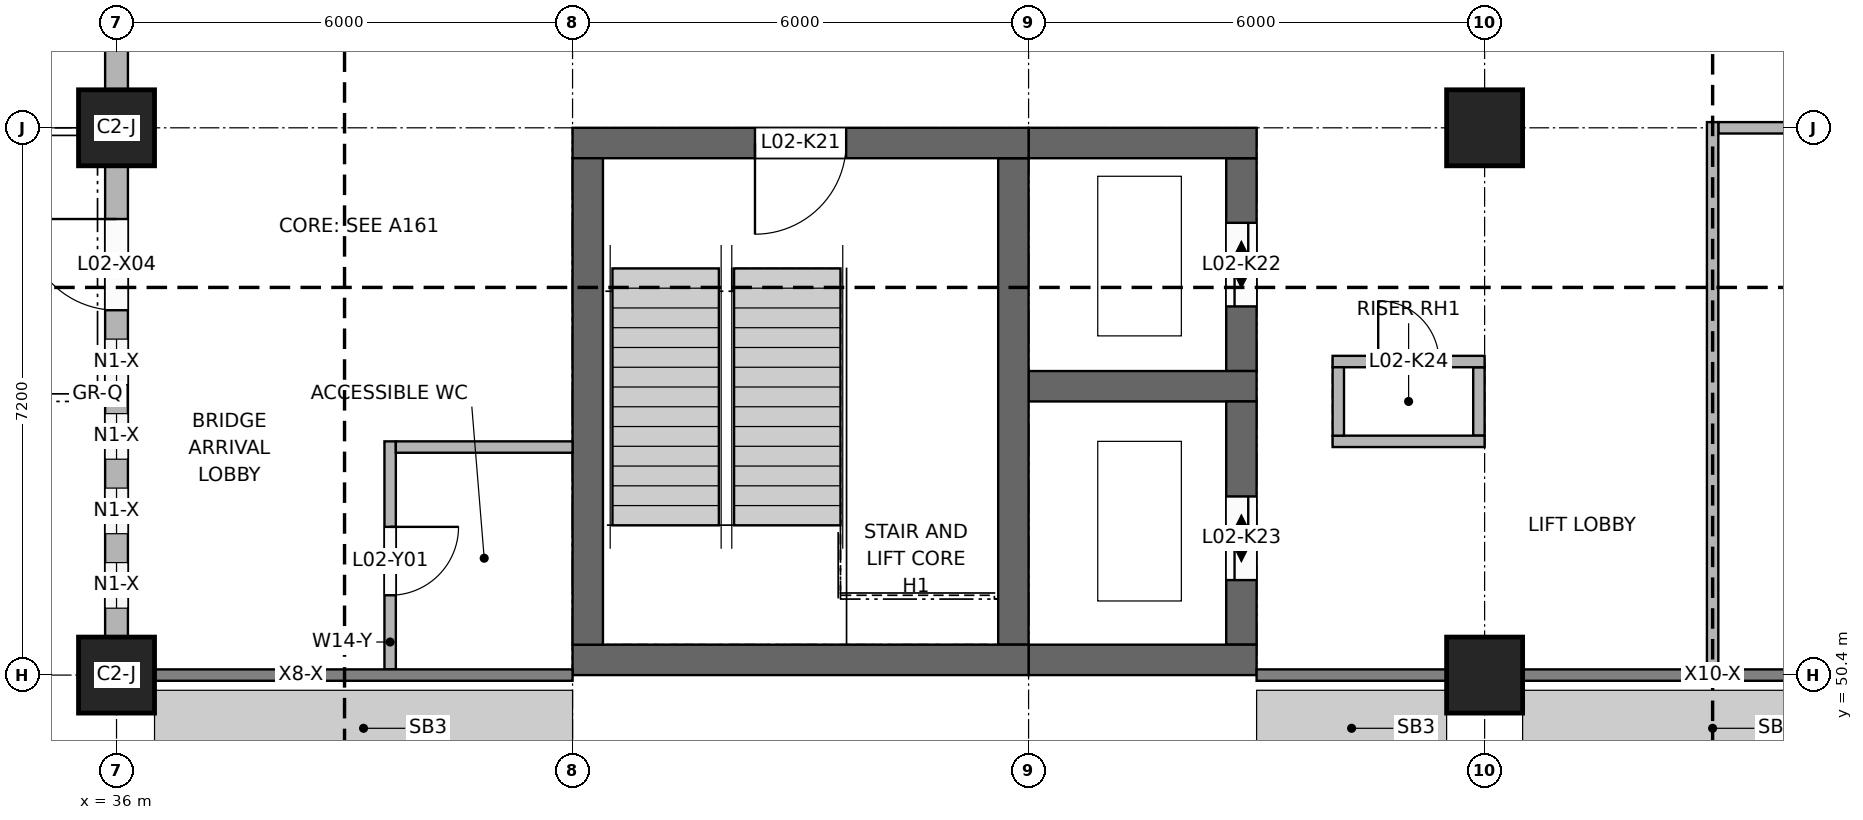
"""IFC4 building model, lengths in metres.
Left out: names, types, materials, properties, quantities, classifications, styles, units other than length and angle.
Written with IfcOpenShell. Run it as: python <this file> out.ifc"""

import sys

from ifc_helpers import new_model, si_unit, direction, frame, frame_2d, origin, origin_2d, place, context, subcontext, project, spatial, rectangle, extrude, element, fill, save


model = new_model("IFC4")
c1 = context("Model", 3, precision=1e-05, world=origin(), true_north=direction((0.0, 1.0)))
c2 = subcontext(c1, "Body", "Model", "MODEL_VIEW")
j1 = project(units=[si_unit("LENGTHUNIT", "METRE"), si_unit("PLANEANGLEUNIT", "RADIAN")], contexts=[c1])
p1 = place(None, origin())
s1 = spatial("IfcSite", under=j1, at=p1, CompositionType="ELEMENT")
p2 = place(p1, origin())
s2 = spatial("IfcBuilding", under=s1, at=p2, CompositionType="ELEMENT")
p3 = place(p2, frame((0.0, 0.0, 8.4)))
s3 = spatial("IfcBuildingStorey", under=s2, at=p3, CompositionType="ELEMENT", Elevation=8.4)
p4 = place(p3, frame((42.0, 50.6, 0.0), z_axis=(0.0, 0.0, 1.0), x_axis=(1.0, 0.0, 0.0)))
e1 = element("IfcWall", 1, at=p4, inside=s3, PredefinedType="SHEAR", context=c2, shape_type="SweptSolid", body=[
    extrude(rectangle(XDim=6.0, YDim=0.4, at=frame_2d((3.0, 0.0))), origin(), (0.0, 0.0, 1.0), 4.0),
])
p5 = place(p3, frame((42.0, 57.4, 0.0), z_axis=(0.0, 0.0, 1.0), x_axis=(1.0, 0.0, 0.0)))
e2 = element("IfcWall", 2, at=p5, inside=s3, PredefinedType="SHEAR", context=c2, shape_type="SweptSolid", body=[
    extrude(rectangle(XDim=6.0, YDim=0.4, at=frame_2d((3.0, 0.0))), origin(), (0.0, 0.0, 1.0), 4.0),
])
p6 = place(p5, frame((2.4, 0.0, 0.0)))
e3 = element("IfcOpeningElement", 3, at=p6, cuts=e2, PredefinedType="OPENING", context=c2, shape_type="SweptSolid", body=[
    extrude(rectangle(XDim=1.2, YDim=2.1, at=frame_2d((0.6, 1.05))), frame((0.0, 0.21, 0.0), z_axis=(0.0, -1.0, 0.0), x_axis=(1.0, 0.0, 0.0)), (0.0, 0.0, 1.0), 0.42),
])
for number, where, z_axis, x_axis in (
    (4, (42.2, 50.8, 0.0), (0.0, 0.0, 1.0), (0.0, 1.0, 0.0)),
    (5, (47.8, 50.8, 0.0), (0.0, 0.0, 1.0), (0.0, 1.0, 0.0)),
):
    element("IfcWall", number, at=place(p3, frame(where, z_axis=z_axis, x_axis=x_axis)), inside=s3, PredefinedType="SHEAR", context=c2, shape_type="SweptSolid", body=[
        extrude(rectangle(XDim=6.4, YDim=0.4, at=frame_2d((3.2, 0.0))), origin(), (0.0, 0.0, 1.0), 4.0),
    ])
for number, where, z_axis, x_axis in (
    (6, (48.0, 54.2, 0.0), (0.0, 0.0, 1.0), (1.0, 0.0, 0.0)),
    (7, (48.0, 57.4, 0.0), (0.0, 0.0, 1.0), (1.0, 0.0, 0.0)),
):
    element("IfcWall", number, at=place(p3, frame(where, z_axis=z_axis, x_axis=x_axis)), inside=s3, PredefinedType="SHEAR", context=c2, shape_type="SweptSolid", body=[
        extrude(rectangle(XDim=3.0, YDim=0.4, at=frame_2d((1.5, 0.0))), origin(), (0.0, 0.0, 1.0), 4.2),
    ])
p7 = place(p3, frame((50.8, 54.4, 0.0), z_axis=(0.0, 0.0, 1.0), x_axis=(0.0, 1.0, 0.0)))
e8 = element("IfcWall", 8, at=p7, inside=s3, PredefinedType="SHEAR", context=c2, shape_type="SweptSolid", body=[
    extrude(rectangle(XDim=2.8, YDim=0.4, at=frame_2d((1.4, 0.0))), origin(), (0.0, 0.0, 1.0), 4.2),
])
p8 = place(p7, frame((0.85, 0.0, 0.0)))
e9 = element("IfcOpeningElement", 9, at=p8, cuts=e8, PredefinedType="OPENING", context=c2, shape_type="SweptSolid", body=[
    extrude(rectangle(XDim=1.1, YDim=2.1, at=frame_2d((0.55, 1.05))), frame((0.0, 0.21, 0.0), z_axis=(0.0, -1.0, 0.0), x_axis=(1.0, 0.0, 0.0)), (0.0, 0.0, 1.0), 0.42),
])
p9 = place(p3, frame((48.0, 50.6, 0.0), z_axis=(0.0, 0.0, 1.0), x_axis=(1.0, 0.0, 0.0)))
e10 = element("IfcWall", 10, at=p9, inside=s3, PredefinedType="SHEAR", context=c2, shape_type="SweptSolid", body=[
    extrude(rectangle(XDim=3.0, YDim=0.4, at=frame_2d((1.5, 0.0))), origin(), (0.0, 0.0, 1.0), 4.2),
])
p10 = place(p3, frame((50.8, 50.8, 0.0), z_axis=(0.0, 0.0, 1.0), x_axis=(0.0, 1.0, 0.0)))
e11 = element("IfcWall", 11, at=p10, inside=s3, PredefinedType="SHEAR", context=c2, shape_type="SweptSolid", body=[
    extrude(rectangle(XDim=3.2, YDim=0.4, at=frame_2d((1.6, 0.0))), origin(), (0.0, 0.0, 1.0), 4.2),
])
p11 = place(p10, frame((0.85, 0.0, 0.0)))
e12 = element("IfcOpeningElement", 12, at=p11, cuts=e11, PredefinedType="OPENING", context=c2, shape_type="SweptSolid", body=[
    extrude(rectangle(XDim=1.1, YDim=2.1, at=frame_2d((0.55, 1.05))), frame((0.0, 0.21, 0.0), z_axis=(0.0, -1.0, 0.0), x_axis=(1.0, 0.0, 0.0)), (0.0, 0.0, 1.0), 0.42),
])
p12 = place(p3, frame((52.0, 53.475, 0.0), z_axis=(0.0, 0.0, 1.0), x_axis=(1.0, 0.0, 0.0)))
e13 = element("IfcWall", 13, at=p12, inside=s3, PredefinedType="SOLIDWALL", context=c2, shape_type="SweptSolid", body=[
    extrude(rectangle(XDim=2.0, YDim=0.15, at=frame_2d((1.0, 0.0))), origin(), (0.0, 0.0, 1.0), 4.2),
])
p13 = place(p3, frame((52.0, 54.525, 0.0), z_axis=(0.0, 0.0, 1.0), x_axis=(1.0, 0.0, 0.0)))
e14 = element("IfcWall", 14, at=p13, inside=s3, PredefinedType="SOLIDWALL", context=c2, shape_type="SweptSolid", body=[
    extrude(rectangle(XDim=2.0, YDim=0.15, at=frame_2d((1.0, 0.0))), origin(), (0.0, 0.0, 1.0), 4.2),
])
p14 = place(p13, frame((0.6, 0.0, 0.0)))
e15 = element("IfcOpeningElement", 15, at=p14, cuts=e14, PredefinedType="OPENING", context=c2, shape_type="SweptSolid", body=[
    extrude(rectangle(XDim=0.8, YDim=2.1, at=frame_2d((0.4, 1.05))), frame((0.0, 0.085, 0.0), z_axis=(0.0, -1.0, 0.0), x_axis=(1.0, 0.0, 0.0)), (0.0, 0.0, 1.0), 0.17),
])
p15 = place(p3, frame((52.075, 53.55, 0.0), z_axis=(0.0, 0.0, 1.0), x_axis=(0.0, 1.0, 0.0)))
e16 = element("IfcWall", 16, at=p15, inside=s3, PredefinedType="SOLIDWALL", context=c2, shape_type="SweptSolid", body=[
    extrude(rectangle(XDim=0.9, YDim=0.15, at=frame_2d((0.45, 0.0))), origin(), (0.0, 0.0, 1.0), 4.2),
])
p16 = place(p3, frame((53.925, 53.55, 0.0), z_axis=(0.0, 0.0, 1.0), x_axis=(0.0, 1.0, 0.0)))
e17 = element("IfcWall", 17, at=p16, inside=s3, PredefinedType="SOLIDWALL", context=c2, shape_type="SweptSolid", body=[
    extrude(rectangle(XDim=0.9, YDim=0.15, at=frame_2d((0.45, 0.0))), origin(), (0.0, 0.0, 1.0), 3.1),
])
for number, where, z_axis, x_axis in (
    (18, (36.0, 50.4, 0.0), (0.0, 0.0, 1.0), (1.0, 0.0, 0.0)),
    (19, (54.0, 50.4, 0.0), (0.0, 0.0, 1.0), (1.0, 0.0, 0.0)),
    (20, (36.0, 57.6, 0.0), (0.0, 0.0, 1.0), (1.0, 0.0, 0.0)),
    (21, (54.0, 57.6, 0.0), (0.0, 0.0, 1.0), (1.0, 0.0, 0.0)),
):
    element("IfcColumn", number, at=place(p3, frame(where, z_axis=z_axis, x_axis=x_axis)), inside=s3, PredefinedType="COLUMN", context=c2, shape_type="SweptSolid", body=[
        extrude(rectangle(XDim=1.0, YDim=1.0, at=origin_2d()), origin(), (0.0, 0.0, 1.0), 4.0),
    ])
p17 = place(p3, frame((36.0, 50.9, 0.0), z_axis=(0.0, 0.0, 1.0), x_axis=(0.0, 1.0, 0.0)))
e22 = element("IfcWall", 22, at=p17, inside=s3, PredefinedType="SOLIDWALL", context=c2, shape_type="SweptSolid", body=[
    extrude(rectangle(XDim=6.2, YDim=0.3, at=frame_2d((3.1, 0.0))), origin(), (0.0, 0.0, 1.0), 3.1),
])
p18 = place(p17, frame((4.3, 0.0, 0.0)))
e23 = element("IfcOpeningElement", 23, at=p18, cuts=e22, PredefinedType="OPENING", context=c2, shape_type="SweptSolid", body=[
    extrude(rectangle(XDim=1.2, YDim=2.4, at=frame_2d((0.6, 1.2))), frame((0.0, 0.16, 0.0), z_axis=(0.0, -1.0, 0.0), x_axis=(1.0, 0.0, 0.0)), (0.0, 0.0, 1.0), 0.32),
])
p19 = place(p17, frame((0.38, 0.0, 0.9)))
e24 = element("IfcOpeningElement", 24, at=p19, cuts=e22, PredefinedType="OPENING", context=c2, shape_type="SweptSolid", body=[
    extrude(rectangle(XDim=0.6, YDim=1.9, at=frame_2d((0.3, 0.95))), frame((0.0, 0.16, 0.0), z_axis=(0.0, -1.0, 0.0), x_axis=(1.0, 0.0, 0.0)), (0.0, 0.0, 1.0), 0.32),
])
p20 = place(p17, frame((1.36, 0.0, 0.9)))
e25 = element("IfcOpeningElement", 25, at=p20, cuts=e22, PredefinedType="OPENING", context=c2, shape_type="SweptSolid", body=[
    extrude(rectangle(XDim=0.6, YDim=1.9, at=frame_2d((0.3, 0.95))), frame((0.0, 0.16, 0.0), z_axis=(0.0, -1.0, 0.0), x_axis=(1.0, 0.0, 0.0)), (0.0, 0.0, 1.0), 0.32),
])
p21 = place(p17, frame((2.34, 0.0, 0.9)))
e26 = element("IfcOpeningElement", 26, at=p21, cuts=e22, PredefinedType="OPENING", context=c2, shape_type="SweptSolid", body=[
    extrude(rectangle(XDim=0.6, YDim=1.9, at=frame_2d((0.3, 0.95))), frame((0.0, 0.16, 0.0), z_axis=(0.0, -1.0, 0.0), x_axis=(1.0, 0.0, 0.0)), (0.0, 0.0, 1.0), 0.32),
])
p22 = place(p17, frame((3.32, 0.0, 0.9)))
e27 = element("IfcOpeningElement", 27, at=p22, cuts=e22, PredefinedType="OPENING", context=c2, shape_type="SweptSolid", body=[
    extrude(rectangle(XDim=0.6, YDim=1.9, at=frame_2d((0.3, 0.95))), frame((0.0, 0.16, 0.0), z_axis=(0.0, -1.0, 0.0), x_axis=(1.0, 0.0, 0.0)), (0.0, 0.0, 1.0), 0.32),
])
p23 = place(p3, frame((36.0, 58.1, 0.0), z_axis=(0.0, 0.0, 1.0), x_axis=(0.0, 1.0, 0.0)))
e28 = element("IfcWall", 28, at=p23, inside=s3, PredefinedType="SOLIDWALL", context=c2, shape_type="SweptSolid", body=[
    extrude(rectangle(XDim=6.2, YDim=0.3, at=frame_2d((3.1, 0.0))), origin(), (0.0, 0.0, 1.0), 3.1),
])
p24 = place(p23, frame((0.51, 0.0, 0.9)))
e29 = element("IfcOpeningElement", 29, at=p24, cuts=e28, PredefinedType="OPENING", context=c2, shape_type="SweptSolid", body=[
    extrude(rectangle(XDim=0.6, YDim=1.9, at=frame_2d((0.3, 0.95))), frame((0.0, 0.16, 0.0), z_axis=(0.0, -1.0, 0.0), x_axis=(1.0, 0.0, 0.0)), (0.0, 0.0, 1.0), 0.32),
])
p25 = place(p23, frame((2.735, 0.0, 0.9)))
e30 = element("IfcOpeningElement", 30, at=p25, cuts=e28, PredefinedType="OPENING", context=c2, shape_type="SweptSolid", body=[
    extrude(rectangle(XDim=0.6, YDim=1.9, at=frame_2d((0.3, 0.95))), frame((0.0, 0.16, 0.0), z_axis=(0.0, -1.0, 0.0), x_axis=(1.0, 0.0, 0.0)), (0.0, 0.0, 1.0), 0.32),
])
p26 = place(p23, frame((3.89, 0.0, 0.9)))
e31 = element("IfcOpeningElement", 31, at=p26, cuts=e28, PredefinedType="OPENING", context=c2, shape_type="SweptSolid", body=[
    extrude(rectangle(XDim=0.6, YDim=1.9, at=frame_2d((0.3, 0.95))), frame((0.0, 0.16, 0.0), z_axis=(0.0, -1.0, 0.0), x_axis=(1.0, 0.0, 0.0)), (0.0, 0.0, 1.0), 0.32),
])
p27 = place(p23, frame((5.045, 0.0, 0.9)))
e32 = element("IfcOpeningElement", 32, at=p27, cuts=e28, PredefinedType="OPENING", context=c2, shape_type="SweptSolid", body=[
    extrude(rectangle(XDim=0.6, YDim=1.9, at=frame_2d((0.3, 0.95))), frame((0.0, 0.16, 0.0), z_axis=(0.0, -1.0, 0.0), x_axis=(1.0, 0.0, 0.0)), (0.0, 0.0, 1.0), 0.32),
])
p28 = place(p3, frame((39.6, 50.475, 0.0), z_axis=(0.0, 0.0, 1.0), x_axis=(0.0, 1.0, 0.0)))
e33 = element("IfcWall", 33, at=p28, inside=s3, PredefinedType="PARTITIONING", context=c2, shape_type="SweptSolid", body=[
    extrude(rectangle(XDim=3.0, YDim=0.15, at=frame_2d((1.5, 0.0))), origin(), (0.0, 0.0, 1.0), 4.0),
])
p29 = place(p28, frame((0.975, 0.0, 0.0)))
e34 = element("IfcOpeningElement", 34, at=p29, cuts=e33, PredefinedType="OPENING", context=c2, shape_type="SweptSolid", body=[
    extrude(rectangle(XDim=0.9, YDim=2.1, at=frame_2d((0.45, 1.05))), frame((0.0, 0.085, 0.0), z_axis=(0.0, -1.0, 0.0), x_axis=(1.0, 0.0, 0.0)), (0.0, 0.0, 1.0), 0.17),
])
p30 = place(p3, frame((57.0, 50.475, 0.0), z_axis=(0.0, 0.0, 1.0), x_axis=(0.0, 1.0, 0.0)))
e35 = element("IfcWall", 35, at=p30, inside=s3, PredefinedType="PARTITIONING", context=c2, shape_type="SweptSolid", body=[
    extrude(rectangle(XDim=7.2, YDim=0.15, at=frame_2d((3.6, 0.0))), origin(), (0.0, 0.0, 1.0), 3.2),
])
p31 = place(p3, frame((39.675, 53.4, 0.0), z_axis=(0.0, 0.0, 1.0), x_axis=(1.0, 0.0, 0.0)))
e36 = element("IfcWall", 36, at=p31, inside=s3, PredefinedType="PARTITIONING", context=c2, shape_type="SweptSolid", body=[
    extrude(rectangle(XDim=2.325, YDim=0.15, at=frame_2d((1.163, 0.0))), origin(), (0.0, 0.0, 1.0), 4.0),
])
p32 = place(p3, frame((57.075, 57.6, 0.0), z_axis=(0.0, 0.0, 1.0), x_axis=(1.0, 0.0, 0.0)))
e37 = element("IfcWall", 37, at=p32, inside=s3, PredefinedType="PARTITIONING", context=c2, shape_type="SweptSolid", body=[
    extrude(rectangle(XDim=23.85, YDim=0.15, at=frame_2d((11.925, 0.0))), origin(), (0.0, 0.0, 1.0), 3.2),
])
p33 = place(p32, frame((3.525, 0.0, 0.0)))
e38 = element("IfcOpeningElement", 38, at=p33, cuts=e37, PredefinedType="OPENING", context=c2, shape_type="SweptSolid", body=[
    extrude(rectangle(XDim=1.2, YDim=2.1, at=frame_2d((0.6, 1.05))), frame((0.0, 0.085, 0.0), z_axis=(0.0, -1.0, 0.0), x_axis=(1.0, 0.0, 0.0)), (0.0, 0.0, 1.0), 0.17),
])
p34 = place(p32, frame((9.825, 0.0, 0.0)))
e39 = element("IfcOpeningElement", 39, at=p34, cuts=e37, PredefinedType="OPENING", context=c2, shape_type="SweptSolid", body=[
    extrude(rectangle(XDim=0.9, YDim=2.1, at=frame_2d((0.45, 1.05))), frame((0.0, 0.085, 0.0), z_axis=(0.0, -1.0, 0.0), x_axis=(1.0, 0.0, 0.0)), (0.0, 0.0, 1.0), 0.17),
])
p35 = place(p32, frame((13.525, 0.0, 0.0)))
e40 = element("IfcOpeningElement", 40, at=p35, cuts=e37, PredefinedType="OPENING", context=c2, shape_type="SweptSolid", body=[
    extrude(rectangle(XDim=0.9, YDim=2.1, at=frame_2d((0.45, 1.05))), frame((0.0, 0.085, 0.0), z_axis=(0.0, -1.0, 0.0), x_axis=(1.0, 0.0, 0.0)), (0.0, 0.0, 1.0), 0.17),
])
p36 = place(p32, frame((18.375, 0.0, 0.0)))
e41 = element("IfcOpeningElement", 41, at=p36, cuts=e37, PredefinedType="OPENING", context=c2, shape_type="SweptSolid", body=[
    extrude(rectangle(XDim=0.9, YDim=2.1, at=frame_2d((0.45, 1.05))), frame((0.0, 0.085, 0.0), z_axis=(0.0, -1.0, 0.0), x_axis=(1.0, 0.0, 0.0)), (0.0, 0.0, 1.0), 0.17),
])
p37 = place(p18, origin())
e42 = element("IfcDoor", 42, at=p37, inside=s3, OperationType="SINGLE_SWING_RIGHT", PredefinedType="DOOR", context=c2, shape_type="SweptSolid", body=[
    extrude(rectangle(XDim=1.2, YDim=2.4, at=frame_2d((0.6, 1.2))), frame((0.0, 0.025, 0.0), z_axis=(0.0, -1.0, 0.0), x_axis=(1.0, 0.0, 0.0)), (0.0, 0.0, 1.0), 0.05),
])
fill(e23, e42)
p38 = place(p19, origin())
e43 = element("IfcWindow", 43, at=p38, inside=s3, PartitioningType="SINGLE_PANEL", PredefinedType="WINDOW", context=c2, shape_type="SweptSolid", body=[
    extrude(rectangle(XDim=0.6, YDim=1.9, at=frame_2d((0.3, 0.95))), frame((0.0, 0.03, 0.0), z_axis=(0.0, -1.0, 0.0), x_axis=(1.0, 0.0, 0.0)), (0.0, 0.0, 1.0), 0.06),
])
fill(e24, e43)
p39 = place(p20, origin())
e44 = element("IfcWindow", 44, at=p39, inside=s3, PartitioningType="SINGLE_PANEL", PredefinedType="WINDOW", context=c2, shape_type="SweptSolid", body=[
    extrude(rectangle(XDim=0.6, YDim=1.9, at=frame_2d((0.3, 0.95))), frame((0.0, 0.03, 0.0), z_axis=(0.0, -1.0, 0.0), x_axis=(1.0, 0.0, 0.0)), (0.0, 0.0, 1.0), 0.06),
])
fill(e25, e44)
p40 = place(p21, origin())
e45 = element("IfcWindow", 45, at=p40, inside=s3, PartitioningType="SINGLE_PANEL", PredefinedType="WINDOW", context=c2, shape_type="SweptSolid", body=[
    extrude(rectangle(XDim=0.6, YDim=1.9, at=frame_2d((0.3, 0.95))), frame((0.0, 0.03, 0.0), z_axis=(0.0, -1.0, 0.0), x_axis=(1.0, 0.0, 0.0)), (0.0, 0.0, 1.0), 0.06),
])
fill(e26, e45)
p41 = place(p22, origin())
e46 = element("IfcWindow", 46, at=p41, inside=s3, PartitioningType="SINGLE_PANEL", PredefinedType="WINDOW", context=c2, shape_type="SweptSolid", body=[
    extrude(rectangle(XDim=0.6, YDim=1.9, at=frame_2d((0.3, 0.95))), frame((0.0, 0.03, 0.0), z_axis=(0.0, -1.0, 0.0), x_axis=(1.0, 0.0, 0.0)), (0.0, 0.0, 1.0), 0.06),
])
fill(e27, e46)
p42 = place(p6, frame((1.2, 0.0, 0.0), z_axis=(0.0, 0.0, 1.0), x_axis=(-1.0, 0.0, 0.0)))
e47 = element("IfcDoor", 47, at=p42, inside=s3, OperationType="SINGLE_SWING_RIGHT", PredefinedType="DOOR", context=c2, shape_type="SweptSolid", body=[
    extrude(rectangle(XDim=1.2, YDim=2.1, at=frame_2d((0.6, 1.05))), frame((0.0, 0.025, 0.0), z_axis=(0.0, -1.0, 0.0), x_axis=(1.0, 0.0, 0.0)), (0.0, 0.0, 1.0), 0.05),
])
fill(e3, e47)
p43 = place(p8, origin())
e48 = element("IfcDoor", 48, at=p43, inside=s3, OperationType="DOUBLE_DOOR_SLIDING", PredefinedType="DOOR", context=c2, shape_type="SweptSolid", body=[
    extrude(rectangle(XDim=1.1, YDim=2.1, at=frame_2d((0.55, 1.05))), frame((0.0, 0.025, 0.0), z_axis=(0.0, -1.0, 0.0), x_axis=(1.0, 0.0, 0.0)), (0.0, 0.0, 1.0), 0.05),
])
fill(e9, e48)
p44 = place(p11, origin())
e49 = element("IfcDoor", 49, at=p44, inside=s3, OperationType="DOUBLE_DOOR_SLIDING", PredefinedType="DOOR", context=c2, shape_type="SweptSolid", body=[
    extrude(rectangle(XDim=1.1, YDim=2.1, at=frame_2d((0.55, 1.05))), frame((0.0, 0.025, 0.0), z_axis=(0.0, -1.0, 0.0), x_axis=(1.0, 0.0, 0.0)), (0.0, 0.0, 1.0), 0.05),
])
fill(e12, e49)
p45 = place(p14, origin())
e50 = element("IfcDoor", 50, at=p45, inside=s3, OperationType="SINGLE_SWING_LEFT", PredefinedType="DOOR", context=c2, shape_type="SweptSolid", body=[
    extrude(rectangle(XDim=0.8, YDim=2.1, at=frame_2d((0.4, 1.05))), frame((0.0, 0.025, 0.0), z_axis=(0.0, -1.0, 0.0), x_axis=(1.0, 0.0, 0.0)), (0.0, 0.0, 1.0), 0.05),
])
fill(e15, e50)
p46 = place(p29, frame((0.9, 0.0, 0.0), z_axis=(0.0, 0.0, 1.0), x_axis=(-1.0, 0.0, 0.0)))
e51 = element("IfcDoor", 51, at=p46, inside=s3, OperationType="SINGLE_SWING_LEFT", PredefinedType="DOOR", context=c2, shape_type="SweptSolid", body=[
    extrude(rectangle(XDim=0.9, YDim=2.1, at=frame_2d((0.45, 1.05))), frame((0.0, 0.025, 0.0), z_axis=(0.0, -1.0, 0.0), x_axis=(1.0, 0.0, 0.0)), (0.0, 0.0, 1.0), 0.05),
])
fill(e34, e51)
save(model, sys.argv[1])
